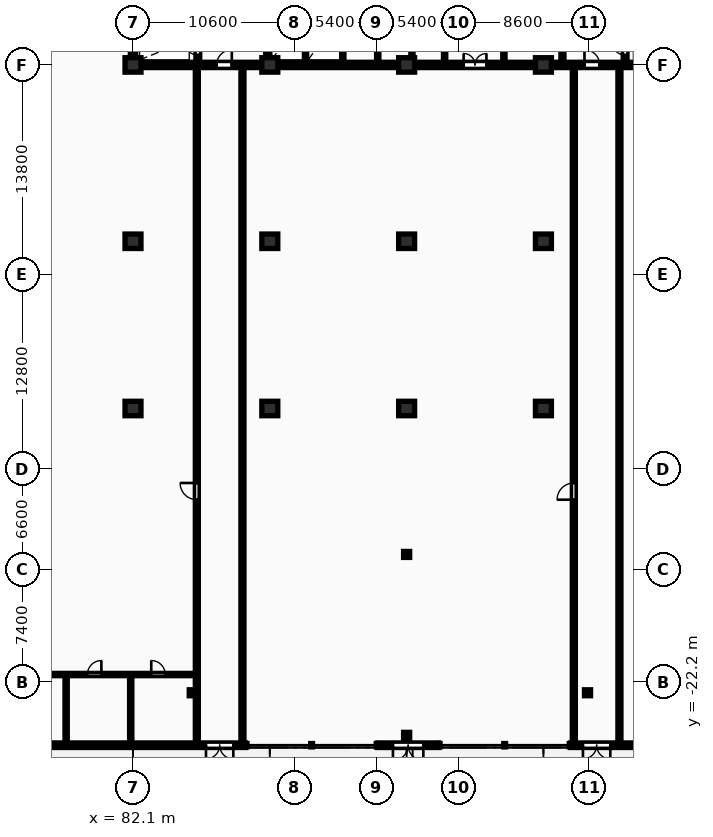
"""IFC4 building model, lengths in metres.
Left out: names, types, materials, properties, quantities, classifications, styles, units other than length and angle.
Written with IfcOpenShell. Run it as: python <this file> out.ifc"""

import sys

from ifc_helpers import new_model, si_unit, direction, frame, frame_2d, origin, origin_2d, place, context, subcontext, project, spatial, rectangle, i_section, extrude, element, fill, save


model = new_model("IFC4")
c1 = context("Model", 3, precision=1e-05, world=origin(), true_north=direction((0.0, 1.0)))
c2 = subcontext(c1, "Body", "Model", "MODEL_VIEW")
j1 = project(units=[si_unit("LENGTHUNIT", "METRE"), si_unit("PLANEANGLEUNIT", "RADIAN")], contexts=[c1])
p1 = place(None, origin())
s1 = spatial("IfcSite", under=j1, at=p1, CompositionType="ELEMENT")
p2 = place(p1, origin())
s2 = spatial("IfcBuilding", under=s1, at=p2, CompositionType="ELEMENT")
p3 = place(p2, origin())
s3 = spatial("IfcBuildingStorey", under=s2, at=p3, CompositionType="ELEMENT", Elevation=0.0)
for number, where, z_axis, x_axis in (
    (1, (82.1, -4.2, 0.0), (0.0, 0.0, 1.0), (1.0, 0.0, 0.0)),
    (2, (82.1, 6.8, 0.0), (0.0, 0.0, 1.0), (1.0, 0.0, 0.0)),
    (3, (82.1, 18.4, 0.0), (0.0, 0.0, 1.0), (1.0, 0.0, 0.0)),
    (4, (91.1, -4.2, 0.0), (0.0, 0.0, 1.0), (1.0, 0.0, 0.0)),
    (5, (91.1, 6.8, 0.0), (0.0, 0.0, 1.0), (1.0, 0.0, 0.0)),
    (6, (91.1, 18.4, 0.0), (0.0, 0.0, 1.0), (1.0, 0.0, 0.0)),
    (7, (100.1, -4.2, 0.0), (0.0, 0.0, 1.0), (1.0, 0.0, 0.0)),
    (8, (100.1, 6.8, 0.0), (0.0, 0.0, 1.0), (1.0, 0.0, 0.0)),
    (9, (100.1, 18.4, 0.0), (0.0, 0.0, 1.0), (1.0, 0.0, 0.0)),
    (10, (109.1, -4.2, 0.0), (0.0, 0.0, 1.0), (1.0, 0.0, 0.0)),
    (11, (109.1, 6.8, 0.0), (0.0, 0.0, 1.0), (1.0, 0.0, 0.0)),
    (12, (109.1, 18.4, 0.0), (0.0, 0.0, 1.0), (1.0, 0.0, 0.0)),
):
    element("IfcColumn", number, at=place(p3, frame(where, z_axis=z_axis, x_axis=x_axis)), inside=s3, PredefinedType="COLUMN", context=c2, shape_type="SweptSolid", body=[
        extrude(rectangle(XDim=1.05, YDim=0.95, at=origin_2d()), origin(), (0.0, 0.0, 1.0), 5.4),
    ])
for number, where, z_axis, x_axis in (
    (13, (100.1, -13.8, 0.0), (0.0, 0.0, 1.0), (1.0, 0.0, 0.0)),
    (14, (86.0, -22.9, 0.0), (0.0, 0.0, 1.0), (1.0, 0.0, 0.0)),
    (15, (112.0, -22.9, 0.0), (0.0, 0.0, 1.0), (1.0, 0.0, 0.0)),
    (16, (100.1, -25.7, 0.0), (0.0, 0.0, 1.0), (1.0, 0.0, 0.0)),
):
    element("IfcColumn", number, at=place(p3, frame(where, z_axis=z_axis, x_axis=x_axis)), inside=s3, PredefinedType="COLUMN", context=c2, shape_type="SweptSolid", body=[
        extrude(i_section(OverallWidth=0.399, OverallDepth=0.394, WebThickness=0.023, FlangeThickness=0.037, FilletRadius=0.015, at=origin_2d()), origin(), (0.0, 0.0, 1.0), 5.4),
    ])
p4 = place(p3, frame((43.5, -26.35, 0.0), z_axis=(0.0, 0.0, 1.0), x_axis=(1.0, 0.0, 0.0)))
e17 = element("IfcWall", 17, at=p4, inside=s3, PredefinedType="STANDARD", context=c2, shape_type="SweptSolid", body=[
    extrude(rectangle(XDim=46.0, YDim=0.3, at=frame_2d((23.0, 0.0))), origin(), (0.0, 0.0, 1.0), 5.1),
])
p5 = place(p4, frame((9.5, 0.0, 0.0)))
e18 = element("IfcOpeningElement", 18, at=p5, cuts=e17, PredefinedType="OPENING", context=c2, shape_type="SweptSolid", body=[
    extrude(rectangle(XDim=2.0, YDim=2.6, at=frame_2d((1.0, 1.3))), frame((0.0, 0.16, 0.0), z_axis=(0.0, -1.0, 0.0), x_axis=(1.0, 0.0, 0.0)), (0.0, 0.0, 1.0), 0.32),
])
p6 = place(p4, frame((24.7, 0.0, 0.0)))
e19 = element("IfcOpeningElement", 19, at=p6, cuts=e17, PredefinedType="OPENING", context=c2, shape_type="SweptSolid", body=[
    extrude(rectangle(XDim=1.8, YDim=2.2, at=frame_2d((0.9, 1.1))), frame((0.0, 0.16, 0.0), z_axis=(0.0, -1.0, 0.0), x_axis=(1.0, 0.0, 0.0)), (0.0, 0.0, 1.0), 0.32),
])
p7 = place(p4, frame((43.4, 0.0, 0.0)))
e20 = element("IfcOpeningElement", 20, at=p7, cuts=e17, PredefinedType="OPENING", context=c2, shape_type="SweptSolid", body=[
    extrude(rectangle(XDim=1.8, YDim=2.2, at=frame_2d((0.9, 1.1))), frame((0.0, 0.16, 0.0), z_axis=(0.0, -1.0, 0.0), x_axis=(1.0, 0.0, 0.0)), (0.0, 0.0, 1.0), 0.32),
])
p8 = place(p3, frame((98.2, -26.35, 0.0), z_axis=(0.0, 0.0, 1.0), x_axis=(1.0, 0.0, 0.0)))
e21 = element("IfcWall", 21, at=p8, inside=s3, PredefinedType="STANDARD", context=c2, shape_type="SweptSolid", body=[
    extrude(rectangle(XDim=4.0, YDim=0.3, at=frame_2d((2.0, 0.0))), origin(), (0.0, 0.0, 1.0), 5.1),
])
p9 = place(p8, frame((1.0, 0.0, 0.0)))
e22 = element("IfcOpeningElement", 22, at=p9, cuts=e21, PredefinedType="OPENING", context=c2, shape_type="SweptSolid", body=[
    extrude(rectangle(XDim=2.0, YDim=2.6, at=frame_2d((1.0, 1.3))), frame((0.0, 0.16, 0.0), z_axis=(0.0, -1.0, 0.0), x_axis=(1.0, 0.0, 0.0)), (0.0, 0.0, 1.0), 0.32),
])
p10 = place(p3, frame((110.9, -26.35, 0.0), z_axis=(0.0, 0.0, 1.0), x_axis=(1.0, 0.0, 0.0)))
e23 = element("IfcWall", 23, at=p10, inside=s3, PredefinedType="STANDARD", context=c2, shape_type="SweptSolid", body=[
    extrude(rectangle(XDim=42.6, YDim=0.3, at=frame_2d((21.3, 0.0))), origin(), (0.0, 0.0, 1.0), 5.1),
])
p11 = place(p10, frame((0.8, 0.0, 0.0)))
e24 = element("IfcOpeningElement", 24, at=p11, cuts=e23, PredefinedType="OPENING", context=c2, shape_type="SweptSolid", body=[
    extrude(rectangle(XDim=1.8, YDim=2.2, at=frame_2d((0.9, 1.1))), frame((0.0, 0.16, 0.0), z_axis=(0.0, -1.0, 0.0), x_axis=(1.0, 0.0, 0.0)), (0.0, 0.0, 1.0), 0.32),
])
p12 = place(p10, frame((6.2, 0.0, 0.0)))
e25 = element("IfcOpeningElement", 25, at=p12, cuts=e23, PredefinedType="OPENING", context=c2, shape_type="SweptSolid", body=[
    extrude(rectangle(XDim=1.8, YDim=2.2, at=frame_2d((0.9, 1.1))), frame((0.0, 0.16, 0.0), z_axis=(0.0, -1.0, 0.0), x_axis=(1.0, 0.0, 0.0)), (0.0, 0.0, 1.0), 0.32),
])
p13 = place(p10, frame((16.0, 0.0, 0.0)))
e26 = element("IfcOpeningElement", 26, at=p13, cuts=e23, PredefinedType="OPENING", context=c2, shape_type="SweptSolid", body=[
    extrude(rectangle(XDim=2.0, YDim=2.6, at=frame_2d((1.0, 1.3))), frame((0.0, 0.16, 0.0), z_axis=(0.0, -1.0, 0.0), x_axis=(1.0, 0.0, 0.0)), (0.0, 0.0, 1.0), 0.32),
])
p14 = place(p10, frame((31.0, 0.0, 0.0)))
e27 = element("IfcOpeningElement", 27, at=p14, cuts=e23, PredefinedType="OPENING", context=c2, shape_type="SweptSolid", body=[
    extrude(rectangle(XDim=2.0, YDim=2.6, at=frame_2d((1.0, 1.3))), frame((0.0, 0.16, 0.0), z_axis=(0.0, -1.0, 0.0), x_axis=(1.0, 0.0, 0.0)), (0.0, 0.0, 1.0), 0.32),
])
p15 = place(p10, frame((24.0, 0.0, 0.9)))
e28 = element("IfcOpeningElement", 28, at=p15, cuts=e23, PredefinedType="OPENING", context=c2, shape_type="SweptSolid", body=[
    extrude(rectangle(XDim=3.0, YDim=2.6, at=frame_2d((1.5, 1.3))), frame((0.0, 0.16, 0.0), z_axis=(0.0, -1.0, 0.0), x_axis=(1.0, 0.0, 0.0)), (0.0, 0.0, 1.0), 0.32),
])
p16 = place(p3, frame((82.1, 18.575, 0.0), z_axis=(0.0, 0.0, 1.0), x_axis=(0.0, 1.0, 0.0)))
e29 = element("IfcWall", 29, at=p16, inside=s3, PredefinedType="SHEAR", context=c2, shape_type="SweptSolid", body=[
    extrude(rectangle(XDim=11.65, YDim=0.35, at=frame_2d((5.825, 0.0))), origin(), (0.0, 0.0, 1.0), 5.4),
])
p17 = place(p3, frame((81.925, 18.4, 0.0), z_axis=(0.0, 0.0, 1.0), x_axis=(1.0, 0.0, 0.0)))
e30 = element("IfcWall", 30, at=p17, inside=s3, PredefinedType="SHEAR", context=c2, shape_type="SweptSolid", body=[
    extrude(rectangle(XDim=36.265, YDim=0.35, at=frame_2d((18.132, 0.0))), origin(), (0.0, 0.0, 1.0), 5.4),
])
p18 = place(p17, frame((5.675, 0.0, 0.0)))
e31 = element("IfcOpeningElement", 31, at=p18, cuts=e30, PredefinedType="OPENING", context=c2, shape_type="SweptSolid", body=[
    extrude(rectangle(XDim=1.0, YDim=2.15, at=frame_2d((0.5, 1.075))), frame((0.0, 0.185, 0.0), z_axis=(0.0, -1.0, 0.0), x_axis=(1.0, 0.0, 0.0)), (0.0, 0.0, 1.0), 0.37),
])
p19 = place(p17, frame((21.925, 0.0, 0.0)))
e32 = element("IfcOpeningElement", 32, at=p19, cuts=e30, PredefinedType="OPENING", context=c2, shape_type="SweptSolid", body=[
    extrude(rectangle(XDim=1.5, YDim=2.2, at=frame_2d((0.75, 1.1))), frame((0.0, 0.185, 0.0), z_axis=(0.0, -1.0, 0.0), x_axis=(1.0, 0.0, 0.0)), (0.0, 0.0, 1.0), 0.37),
])
p20 = place(p17, frame((29.875, 0.0, 0.0)))
e33 = element("IfcOpeningElement", 33, at=p20, cuts=e30, PredefinedType="OPENING", context=c2, shape_type="SweptSolid", body=[
    extrude(rectangle(XDim=1.0, YDim=2.15, at=frame_2d((0.5, 1.075))), frame((0.0, 0.185, 0.0), z_axis=(0.0, -1.0, 0.0), x_axis=(1.0, 0.0, 0.0)), (0.0, 0.0, 1.0), 0.37),
])
p21 = place(p3, frame((86.365, 18.6, 0.0), z_axis=(0.0, 0.0, 1.0), x_axis=(0.0, 1.0, 0.0)))
e34 = element("IfcWall", 34, at=p21, inside=s3, PredefinedType="SHEAR", context=c2, shape_type="SweptSolid", body=[
    extrude(rectangle(XDim=11.6, YDim=0.25, at=frame_2d((5.8, 0.0))), origin(), (0.0, 0.0, 1.0), 5.4),
])
p22 = place(p21, frame((0.45, 0.0, 0.0)))
e35 = element("IfcOpeningElement", 35, at=p22, cuts=e34, PredefinedType="OPENING", context=c2, shape_type="SweptSolid", body=[
    extrude(rectangle(XDim=0.85, YDim=2.05, at=frame_2d((0.425, 1.025))), frame((0.0, 0.135, 0.0), z_axis=(0.0, -1.0, 0.0), x_axis=(1.0, 0.0, 0.0)), (0.0, 0.0, 1.0), 0.27),
])
p23 = place(p21, frame((2.05, 0.0, 0.0)))
e36 = element("IfcOpeningElement", 36, at=p23, cuts=e34, PredefinedType="OPENING", context=c2, shape_type="SweptSolid", body=[
    extrude(rectangle(XDim=1.1, YDim=2.1, at=frame_2d((0.55, 1.05))), frame((0.0, 0.135, 0.0), z_axis=(0.0, -1.0, 0.0), x_axis=(1.0, 0.0, 0.0)), (0.0, 0.0, 1.0), 0.27),
])
p24 = place(p21, frame((9.95, 0.0, 0.0)))
e37 = element("IfcOpeningElement", 37, at=p24, cuts=e34, PredefinedType="OPENING", context=c2, shape_type="SweptSolid", body=[
    extrude(rectangle(XDim=0.85, YDim=2.05, at=frame_2d((0.425, 1.025))), frame((0.0, 0.135, 0.0), z_axis=(0.0, -1.0, 0.0), x_axis=(1.0, 0.0, 0.0)), (0.0, 0.0, 1.0), 0.27),
])
p25 = place(p3, frame((90.95, 18.6, 0.0), z_axis=(0.0, 0.0, 1.0), x_axis=(0.0, 1.0, 0.0)))
e38 = element("IfcWall", 38, at=p25, inside=s3, PredefinedType="SHEAR", context=c2, shape_type="SweptSolid", body=[
    extrude(rectangle(XDim=11.6, YDim=0.25, at=frame_2d((5.8, 0.0))), origin(), (0.0, 0.0, 1.0), 5.4),
])
p26 = place(p25, frame((4.6, 0.0, 0.0)))
e39 = element("IfcOpeningElement", 39, at=p26, cuts=e38, PredefinedType="OPENING", context=c2, shape_type="SweptSolid", body=[
    extrude(rectangle(XDim=1.1, YDim=2.1, at=frame_2d((0.55, 1.05))), frame((0.0, 0.135, 0.0), z_axis=(0.0, -1.0, 0.0), x_axis=(1.0, 0.0, 0.0)), (0.0, 0.0, 1.0), 0.27),
])
for number, where, z_axis, x_axis in (
    (40, (93.45, 18.6, 0.0), (0.0, 0.0, 1.0), (0.0, 1.0, 0.0)),
    (41, (95.9, 18.6, 0.0), (0.0, 0.0, 1.0), (0.0, 1.0, 0.0)),
    (42, (98.2, 18.6, 0.0), (0.0, 0.0, 1.0), (0.0, 1.0, 0.0)),
):
    element("IfcWall", number, at=place(p3, frame(where, z_axis=z_axis, x_axis=x_axis)), inside=s3, PredefinedType="PARTITIONING", context=c2, shape_type="SweptSolid", body=[
        extrude(rectangle(XDim=3.6, YDim=0.15, at=frame_2d((1.8, 0.0))), origin(), (0.0, 0.0, 1.0), 5.1),
    ])
p27 = place(p3, frame((100.45, 18.6, 0.0), z_axis=(0.0, 0.0, 1.0), x_axis=(0.0, 1.0, 0.0)))
e43 = element("IfcWall", 43, at=p27, inside=s3, PredefinedType="PARTITIONING", context=c2, shape_type="SweptSolid", body=[
    extrude(rectangle(XDim=3.6, YDim=0.15, at=frame_2d((1.8, 0.0))), origin(), (0.0, 0.0, 1.0), 4.35),
])
for number, where, z_axis, x_axis in (
    (44, (102.6, 18.6, 0.0), (0.0, 0.0, 1.0), (0.0, 1.0, 0.0)),
    (45, (106.5, 18.6, 0.0), (0.0, 0.0, 1.0), (0.0, 1.0, 0.0)),
):
    element("IfcWall", number, at=place(p3, frame(where, z_axis=z_axis, x_axis=x_axis)), inside=s3, PredefinedType="PARTITIONING", context=c2, shape_type="SweptSolid", body=[
        extrude(rectangle(XDim=3.6, YDim=0.15, at=frame_2d((1.8, 0.0))), origin(), (0.0, 0.0, 1.0), 5.1),
    ])
p28 = place(p3, frame((110.35, 18.6, 0.0), z_axis=(0.0, 0.0, 1.0), x_axis=(0.0, 1.0, 0.0)))
e46 = element("IfcWall", 46, at=p28, inside=s3, PredefinedType="PARTITIONING", context=c2, shape_type="SweptSolid", body=[
    extrude(rectangle(XDim=11.6, YDim=0.2, at=frame_2d((5.8, 0.0))), origin(), (0.0, 0.0, 1.0), 5.1),
])
p29 = place(p28, frame((5.2, 0.0, 0.0)))
e47 = element("IfcOpeningElement", 47, at=p29, cuts=e46, PredefinedType="OPENING", context=c2, shape_type="SweptSolid", body=[
    extrude(rectangle(XDim=1.1, YDim=2.15, at=frame_2d((0.55, 1.075))), frame((0.0, 0.11, 0.0), z_axis=(0.0, -1.0, 0.0), x_axis=(1.0, 0.0, 0.0)), (0.0, 0.0, 1.0), 0.22),
])
p30 = place(p3, frame((114.475, 18.6, 0.0), z_axis=(0.0, 0.0, 1.0), x_axis=(0.0, 1.0, 0.0)))
e48 = element("IfcWall", 48, at=p30, inside=s3, PredefinedType="SHEAR", context=c2, shape_type="SweptSolid", body=[
    extrude(rectangle(XDim=11.6, YDim=0.25, at=frame_2d((5.8, 0.0))), origin(), (0.0, 0.0, 1.0), 5.4),
])
p31 = place(p30, frame((0.45, 0.0, 0.0)))
e49 = element("IfcOpeningElement", 49, at=p31, cuts=e48, PredefinedType="OPENING", context=c2, shape_type="SweptSolid", body=[
    extrude(rectangle(XDim=0.85, YDim=2.05, at=frame_2d((0.425, 1.025))), frame((0.0, 0.135, 0.0), z_axis=(0.0, -1.0, 0.0), x_axis=(1.0, 0.0, 0.0)), (0.0, 0.0, 1.0), 0.27),
])
p32 = place(p30, frame((2.05, 0.0, 0.0)))
e50 = element("IfcOpeningElement", 50, at=p32, cuts=e48, PredefinedType="OPENING", context=c2, shape_type="SweptSolid", body=[
    extrude(rectangle(XDim=1.1, YDim=2.1, at=frame_2d((0.55, 1.05))), frame((0.0, 0.135, 0.0), z_axis=(0.0, -1.0, 0.0), x_axis=(1.0, 0.0, 0.0)), (0.0, 0.0, 1.0), 0.27),
])
p33 = place(p30, frame((9.95, 0.0, 0.0)))
e51 = element("IfcOpeningElement", 51, at=p33, cuts=e48, PredefinedType="OPENING", context=c2, shape_type="SweptSolid", body=[
    extrude(rectangle(XDim=0.85, YDim=2.05, at=frame_2d((0.425, 1.025))), frame((0.0, 0.135, 0.0), z_axis=(0.0, -1.0, 0.0), x_axis=(1.0, 0.0, 0.0)), (0.0, 0.0, 1.0), 0.27),
])
p34 = place(p3, frame((86.3, -26.2, 0.0), z_axis=(0.0, 0.0, 1.0), x_axis=(0.0, 1.0, 0.0)))
e52 = element("IfcWall", 52, at=p34, inside=s3, PredefinedType="PARTITIONING", context=c2, shape_type="SweptSolid", body=[
    extrude(rectangle(XDim=44.35, YDim=0.2, at=frame_2d((22.175, 0.0))), origin(), (0.0, 0.0, 1.0), 5.1),
])
p35 = place(p34, frame((16.0, 0.0, 0.0)))
e53 = element("IfcOpeningElement", 53, at=p35, cuts=e52, PredefinedType="OPENING", context=c2, shape_type="SweptSolid", body=[
    extrude(rectangle(XDim=1.1, YDim=2.1, at=frame_2d((0.55, 1.05))), frame((0.0, 0.11, 0.0), z_axis=(0.0, -1.0, 0.0), x_axis=(1.0, 0.0, 0.0)), (0.0, 0.0, 1.0), 0.22),
])
p36 = place(p3, frame((89.3, -26.2, 0.0), z_axis=(0.0, 0.0, 1.0), x_axis=(0.0, 1.0, 0.0)))
e54 = element("IfcWall", 54, at=p36, inside=s3, PredefinedType="PARTITIONING", context=c2, shape_type="SweptSolid", body=[
    extrude(rectangle(XDim=44.35, YDim=0.2, at=frame_2d((22.175, 0.0))), origin(), (0.0, 0.0, 1.0), 5.1),
])
p37 = place(p3, frame((111.1, -26.2, 0.0), z_axis=(0.0, 0.0, 1.0), x_axis=(0.0, 1.0, 0.0)))
e55 = element("IfcWall", 55, at=p37, inside=s3, PredefinedType="PARTITIONING", context=c2, shape_type="SweptSolid", body=[
    extrude(rectangle(XDim=44.35, YDim=0.2, at=frame_2d((22.175, 0.0))), origin(), (0.0, 0.0, 1.0), 5.1),
])
p38 = place(p37, frame((16.0, 0.0, 0.0)))
e56 = element("IfcOpeningElement", 56, at=p38, cuts=e55, PredefinedType="OPENING", context=c2, shape_type="SweptSolid", body=[
    extrude(rectangle(XDim=1.1, YDim=2.1, at=frame_2d((0.55, 1.05))), frame((0.0, 0.11, 0.0), z_axis=(0.0, -1.0, 0.0), x_axis=(1.0, 0.0, 0.0)), (0.0, 0.0, 1.0), 0.22),
])
p39 = place(p3, frame((114.1, -26.2, 0.0), z_axis=(0.0, 0.0, 1.0), x_axis=(0.0, 1.0, 0.0)))
e57 = element("IfcWall", 57, at=p39, inside=s3, PredefinedType="PARTITIONING", context=c2, shape_type="SweptSolid", body=[
    extrude(rectangle(XDim=44.35, YDim=0.2, at=frame_2d((22.175, 0.0))), origin(), (0.0, 0.0, 1.0), 5.1),
])
p40 = place(p3, frame((72.7, -21.7, 0.0), z_axis=(0.0, 0.0, 1.0), x_axis=(1.0, 0.0, 0.0)))
e58 = element("IfcWall", 58, at=p40, inside=s3, PredefinedType="PARTITIONING", context=c2, shape_type="SweptSolid", body=[
    extrude(rectangle(XDim=13.5, YDim=0.15, at=frame_2d((6.75, 0.0))), origin(), (0.0, 0.0, 1.0), 5.1),
])
p41 = place(p40, frame((1.8, 0.0, 0.0)))
e59 = element("IfcOpeningElement", 59, at=p41, cuts=e58, PredefinedType="OPENING", context=c2, shape_type="SweptSolid", body=[
    extrude(rectangle(XDim=0.96, YDim=2.1, at=frame_2d((0.48, 1.05))), frame((0.0, 0.085, 0.0), z_axis=(0.0, -1.0, 0.0), x_axis=(1.0, 0.0, 0.0)), (0.0, 0.0, 1.0), 0.17),
])
p42 = place(p40, frame((6.4, 0.0, 0.0)))
e60 = element("IfcOpeningElement", 60, at=p42, cuts=e58, PredefinedType="OPENING", context=c2, shape_type="SweptSolid", body=[
    extrude(rectangle(XDim=0.92, YDim=2.08, at=frame_2d((0.46, 1.04))), frame((0.0, 0.085, 0.0), z_axis=(0.0, -1.0, 0.0), x_axis=(1.0, 0.0, 0.0)), (0.0, 0.0, 1.0), 0.17),
])
p43 = place(p40, frame((10.6, 0.0, 0.0)))
e61 = element("IfcOpeningElement", 61, at=p43, cuts=e58, PredefinedType="OPENING", context=c2, shape_type="SweptSolid", body=[
    extrude(rectangle(XDim=0.92, YDim=2.08, at=frame_2d((0.46, 1.04))), frame((0.0, 0.085, 0.0), z_axis=(0.0, -1.0, 0.0), x_axis=(1.0, 0.0, 0.0)), (0.0, 0.0, 1.0), 0.17),
])
for number, where, z_axis, x_axis in (
    (62, (77.7, -26.2, 0.0), (0.0, 0.0, 1.0), (0.0, 1.0, 0.0)),
    (63, (81.95, -26.2, 0.0), (0.0, 0.0, 1.0), (0.0, 1.0, 0.0)),
):
    element("IfcWall", number, at=place(p3, frame(where, z_axis=z_axis, x_axis=x_axis)), inside=s3, PredefinedType="PARTITIONING", context=c2, shape_type="SweptSolid", body=[
        extrude(rectangle(XDim=4.4, YDim=0.15, at=frame_2d((2.2, 0.0))), origin(), (0.0, 0.0, 1.0), 5.1),
    ])
p44 = place(p7, frame((1.8, 0.0, 0.0), z_axis=(0.0, 0.0, 1.0), x_axis=(-1.0, 0.0, 0.0)))
e64 = element("IfcDoor", 64, at=p44, inside=s3, OperationType="DOUBLE_DOOR_SINGLE_SWING", PredefinedType="DOOR", context=c2, shape_type="SweptSolid", body=[
    extrude(rectangle(XDim=1.8, YDim=2.2, at=frame_2d((0.9, 1.1))), frame((0.0, 0.025, 0.0), z_axis=(0.0, -1.0, 0.0), x_axis=(1.0, 0.0, 0.0)), (0.0, 0.0, 1.0), 0.05),
])
fill(e20, e64)
p45 = place(p9, frame((2.0, 0.0, 0.0), z_axis=(0.0, 0.0, 1.0), x_axis=(-1.0, 0.0, 0.0)))
e65 = element("IfcDoor", 65, at=p45, inside=s3, OperationType="DOUBLE_DOOR_SINGLE_SWING", PredefinedType="DOOR", context=c2, shape_type="SweptSolid", body=[
    extrude(rectangle(XDim=2.0, YDim=2.6, at=frame_2d((1.0, 1.3))), frame((0.0, 0.025, 0.0), z_axis=(0.0, -1.0, 0.0), x_axis=(1.0, 0.0, 0.0)), (0.0, 0.0, 1.0), 0.05),
])
fill(e22, e65)
p46 = place(p11, frame((1.8, 0.0, 0.0), z_axis=(0.0, 0.0, 1.0), x_axis=(-1.0, 0.0, 0.0)))
e66 = element("IfcDoor", 66, at=p46, inside=s3, OperationType="DOUBLE_DOOR_SINGLE_SWING", PredefinedType="DOOR", context=c2, shape_type="SweptSolid", body=[
    extrude(rectangle(XDim=1.8, YDim=2.2, at=frame_2d((0.9, 1.1))), frame((0.0, 0.025, 0.0), z_axis=(0.0, -1.0, 0.0), x_axis=(1.0, 0.0, 0.0)), (0.0, 0.0, 1.0), 0.05),
])
fill(e24, e66)
p47 = place(p18, origin())
e67 = element("IfcDoor", 67, at=p47, inside=s3, OperationType="SINGLE_SWING_RIGHT", PredefinedType="DOOR", context=c2, shape_type="SweptSolid", body=[
    extrude(rectangle(XDim=1.0, YDim=2.15, at=frame_2d((0.5, 1.075))), frame((0.0, 0.025, 0.0), z_axis=(0.0, -1.0, 0.0), x_axis=(1.0, 0.0, 0.0)), (0.0, 0.0, 1.0), 0.05),
])
fill(e31, e67)
p48 = place(p19, origin())
e68 = element("IfcDoor", 68, at=p48, inside=s3, OperationType="DOUBLE_DOOR_SINGLE_SWING", PredefinedType="DOOR", context=c2, shape_type="SweptSolid", body=[
    extrude(rectangle(XDim=1.5, YDim=2.2, at=frame_2d((0.75, 1.1))), frame((0.0, 0.025, 0.0), z_axis=(0.0, -1.0, 0.0), x_axis=(1.0, 0.0, 0.0)), (0.0, 0.0, 1.0), 0.05),
])
fill(e32, e68)
p49 = place(p20, origin())
e69 = element("IfcDoor", 69, at=p49, inside=s3, OperationType="SINGLE_SWING_LEFT", PredefinedType="DOOR", context=c2, shape_type="SweptSolid", body=[
    extrude(rectangle(XDim=1.0, YDim=2.15, at=frame_2d((0.5, 1.075))), frame((0.0, 0.025, 0.0), z_axis=(0.0, -1.0, 0.0), x_axis=(1.0, 0.0, 0.0)), (0.0, 0.0, 1.0), 0.05),
])
fill(e33, e69)
p50 = place(p22, origin())
e70 = element("IfcDoor", 70, at=p50, inside=s3, OperationType="SINGLE_SWING_RIGHT", PredefinedType="DOOR", context=c2, shape_type="SweptSolid", body=[
    extrude(rectangle(XDim=0.85, YDim=2.05, at=frame_2d((0.425, 1.025))), frame((0.0, 0.025, 0.0), z_axis=(0.0, -1.0, 0.0), x_axis=(1.0, 0.0, 0.0)), (0.0, 0.0, 1.0), 0.05),
])
fill(e35, e70)
p51 = place(p31, origin())
e71 = element("IfcDoor", 71, at=p51, inside=s3, OperationType="SINGLE_SWING_RIGHT", PredefinedType="DOOR", context=c2, shape_type="SweptSolid", body=[
    extrude(rectangle(XDim=0.85, YDim=2.05, at=frame_2d((0.425, 1.025))), frame((0.0, 0.025, 0.0), z_axis=(0.0, -1.0, 0.0), x_axis=(1.0, 0.0, 0.0)), (0.0, 0.0, 1.0), 0.05),
])
fill(e49, e71)
p52 = place(p35, origin())
e72 = element("IfcDoor", 72, at=p52, inside=s3, OperationType="SINGLE_SWING_RIGHT", PredefinedType="DOOR", context=c2, shape_type="SweptSolid", body=[
    extrude(rectangle(XDim=1.1, YDim=2.1, at=frame_2d((0.55, 1.05))), frame((0.0, 0.025, 0.0), z_axis=(0.0, -1.0, 0.0), x_axis=(1.0, 0.0, 0.0)), (0.0, 0.0, 1.0), 0.05),
])
fill(e53, e72)
p53 = place(p38, origin())
e73 = element("IfcDoor", 73, at=p53, inside=s3, OperationType="SINGLE_SWING_LEFT", PredefinedType="DOOR", context=c2, shape_type="SweptSolid", body=[
    extrude(rectangle(XDim=1.1, YDim=2.1, at=frame_2d((0.55, 1.05))), frame((0.0, 0.025, 0.0), z_axis=(0.0, -1.0, 0.0), x_axis=(1.0, 0.0, 0.0)), (0.0, 0.0, 1.0), 0.05),
])
fill(e56, e73)
p54 = place(p42, origin())
e74 = element("IfcDoor", 74, at=p54, inside=s3, OperationType="SINGLE_SWING_RIGHT", PredefinedType="DOOR", context=c2, shape_type="SweptSolid", body=[
    extrude(rectangle(XDim=0.92, YDim=2.08, at=frame_2d((0.46, 1.04))), frame((0.0, 0.025, 0.0), z_axis=(0.0, -1.0, 0.0), x_axis=(1.0, 0.0, 0.0)), (0.0, 0.0, 1.0), 0.05),
])
fill(e60, e74)
p55 = place(p43, origin())
e75 = element("IfcDoor", 75, at=p55, inside=s3, OperationType="SINGLE_SWING_LEFT", PredefinedType="DOOR", context=c2, shape_type="SweptSolid", body=[
    extrude(rectangle(XDim=0.92, YDim=2.08, at=frame_2d((0.46, 1.04))), frame((0.0, 0.025, 0.0), z_axis=(0.0, -1.0, 0.0), x_axis=(1.0, 0.0, 0.0)), (0.0, 0.0, 1.0), 0.05),
])
fill(e61, e75)
save(model, sys.argv[1])
